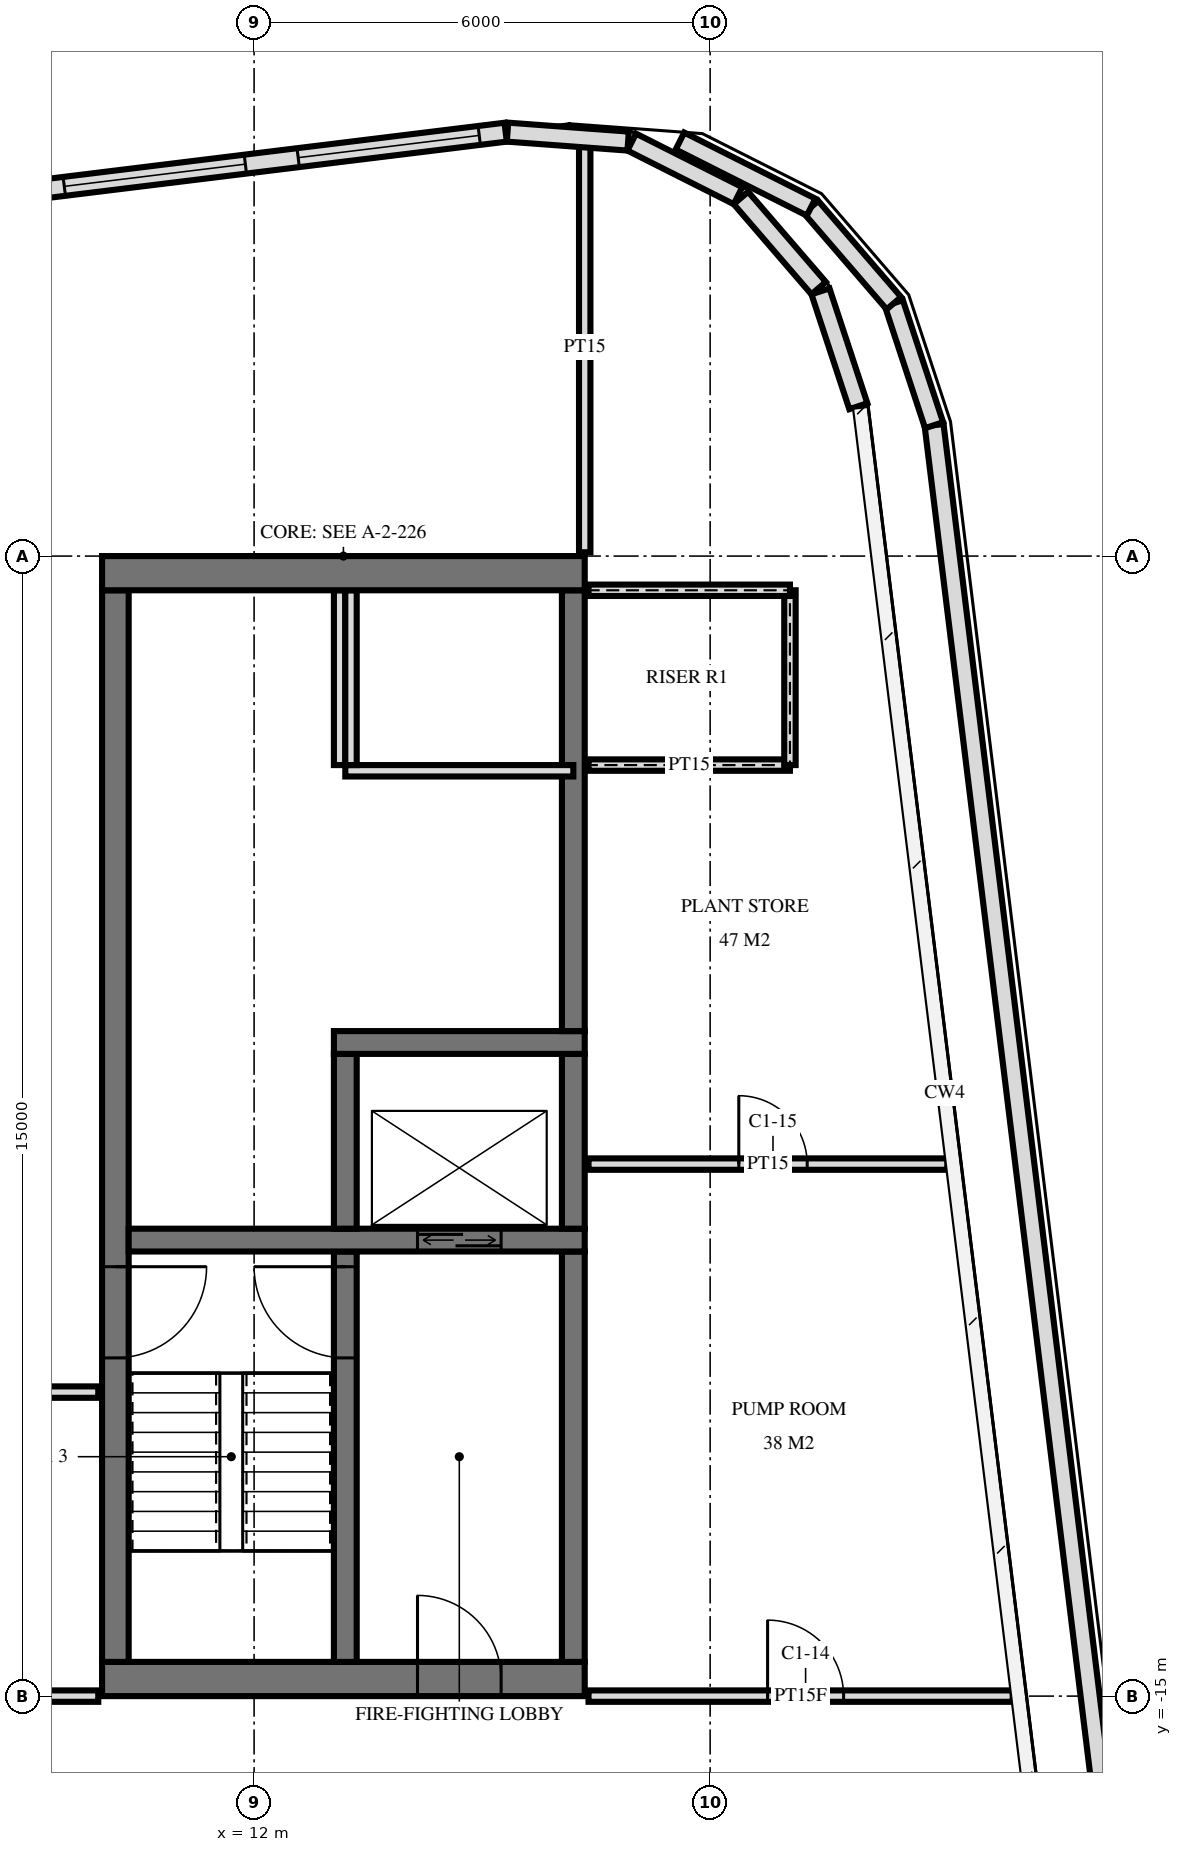
"""IFC4 building model, lengths in metres.
Left out: names, types, materials, properties, quantities, classifications, styles, units other than length and angle.
Written with IfcOpenShell. Run it as: python <this file> out.ifc"""

import sys

from ifc_helpers import new_model, si_unit, direction, frame, frame_2d, origin, place, context, subcontext, project, spatial, rectangle, extrude, element, fill, save


model = new_model("IFC4")
c1 = context("Model", 3, precision=1e-05, world=origin(), true_north=direction((0.0, 1.0)))
c2 = subcontext(c1, "Body", "Model", "MODEL_VIEW")
j1 = project(units=[si_unit("LENGTHUNIT", "METRE"), si_unit("PLANEANGLEUNIT", "RADIAN")], contexts=[c1])
p1 = place(None, origin())
s1 = spatial("IfcSite", under=j1, at=p1, CompositionType="ELEMENT")
p2 = place(p1, origin())
s2 = spatial("IfcBuilding", under=s1, at=p2, CompositionType="ELEMENT")
p3 = place(p2, frame((0.0, 0.0, 346.6)))
s3 = spatial("IfcBuildingStorey", under=s2, at=p3, CompositionType="ELEMENT", Elevation=346.6)
p4 = place(p3, frame((10.0, -0.225, 0.0), z_axis=(0.0, 0.0, 1.0), x_axis=(1.0, 0.0, 0.0)))
e1 = element("IfcWall", 1, at=p4, inside=s3, PredefinedType="SHEAR", context=c2, shape_type="SweptSolid", body=[
    extrude(rectangle(XDim=6.35, YDim=0.45, at=frame_2d((3.175, 0.0))), origin(), (0.0, 0.0, 1.0), 3.6),
])
p5 = place(p3, frame((10.0, -14.775, 0.0), z_axis=(0.0, 0.0, 1.0), x_axis=(1.0, 0.0, 0.0)))
e2 = element("IfcWall", 2, at=p5, inside=s3, PredefinedType="SHEAR", context=c2, shape_type="SweptSolid", body=[
    extrude(rectangle(XDim=6.35, YDim=0.45, at=frame_2d((3.175, 0.0))), origin(), (0.0, 0.0, 1.0), 3.6),
])
p6 = place(p5, frame((4.15, 0.0, 0.0)))
e3 = element("IfcOpeningElement", 3, at=p6, cuts=e2, PredefinedType="OPENING", context=c2, shape_type="SweptSolid", body=[
    extrude(rectangle(XDim=1.1, YDim=2.1, at=frame_2d((0.55, 1.05))), frame((0.0, 0.235, 0.0), z_axis=(0.0, -1.0, 0.0), x_axis=(1.0, 0.0, 0.0)), (0.0, 0.0, 1.0), 0.47),
])
p7 = place(p3, frame((10.175, -14.55, 0.0), z_axis=(0.0, 0.0, 1.0), x_axis=(0.0, 1.0, 0.0)))
e4 = element("IfcWall", 4, at=p7, inside=s3, PredefinedType="SHEAR", context=c2, shape_type="SweptSolid", body=[
    extrude(rectangle(XDim=14.1, YDim=0.35, at=frame_2d((7.05, 0.0))), origin(), (0.0, 0.0, 1.0), 3.6),
])
p8 = place(p7, frame((4.0, 0.0, 0.0)))
e5 = element("IfcOpeningElement", 5, at=p8, cuts=e4, PredefinedType="OPENING", context=c2, shape_type="SweptSolid", body=[
    extrude(rectangle(XDim=1.2, YDim=2.1, at=frame_2d((0.6, 1.05))), frame((0.0, 0.185, 0.0), z_axis=(0.0, -1.0, 0.0), x_axis=(1.0, 0.0, 0.0)), (0.0, 0.0, 1.0), 0.37),
])
p9 = place(p3, frame((16.2, -6.25, 0.0), z_axis=(0.0, 0.0, 1.0), x_axis=(0.0, 1.0, 0.0)))
e6 = element("IfcWall", 6, at=p9, inside=s3, PredefinedType="SHEAR", context=c2, shape_type="SweptSolid", body=[
    extrude(rectangle(XDim=5.8, YDim=0.3, at=frame_2d((2.9, 0.0))), origin(), (0.0, 0.0, 1.0), 3.6),
])
p10 = place(p3, frame((16.2, -14.55, 0.0), z_axis=(0.0, 0.0, 1.0), x_axis=(0.0, 1.0, 0.0)))
e7 = element("IfcWall", 7, at=p10, inside=s3, PredefinedType="SHEAR", context=c2, shape_type="SweptSolid", body=[
    extrude(rectangle(XDim=5.4, YDim=0.3, at=frame_2d((2.7, 0.0))), origin(), (0.0, 0.0, 1.0), 3.6),
])
p11 = place(p3, frame((10.35, -9.0, 0.0), z_axis=(0.0, 0.0, 1.0), x_axis=(1.0, 0.0, 0.0)))
e8 = element("IfcWall", 8, at=p11, inside=s3, PredefinedType="SHEAR", context=c2, shape_type="SweptSolid", body=[
    extrude(rectangle(XDim=6.0, YDim=0.3, at=frame_2d((3.0, 0.0))), origin(), (0.0, 0.0, 1.0), 3.6),
])
p12 = place(p11, frame((3.8, 0.0, 0.0)))
e9 = element("IfcOpeningElement", 9, at=p12, cuts=e8, PredefinedType="OPENING", context=c2, shape_type="SweptSolid", body=[
    extrude(rectangle(XDim=1.1, YDim=2.1, at=frame_2d((0.55, 1.05))), frame((0.0, 0.16, 0.0), z_axis=(0.0, -1.0, 0.0), x_axis=(1.0, 0.0, 0.0)), (0.0, 0.0, 1.0), 0.32),
])
p13 = place(p3, frame((13.2, -14.55, 0.0), z_axis=(0.0, 0.0, 1.0), x_axis=(0.0, 1.0, 0.0)))
e10 = element("IfcWall", 10, at=p13, inside=s3, PredefinedType="SHEAR", context=c2, shape_type="SweptSolid", body=[
    extrude(rectangle(XDim=5.4, YDim=0.3, at=frame_2d((2.7, 0.0))), origin(), (0.0, 0.0, 1.0), 3.6),
])
p14 = place(p13, frame((4.0, 0.0, 0.0)))
e11 = element("IfcOpeningElement", 11, at=p14, cuts=e10, PredefinedType="OPENING", context=c2, shape_type="SweptSolid", body=[
    extrude(rectangle(XDim=1.2, YDim=2.1, at=frame_2d((0.6, 1.05))), frame((0.0, 0.16, 0.0), z_axis=(0.0, -1.0, 0.0), x_axis=(1.0, 0.0, 0.0)), (0.0, 0.0, 1.0), 0.32),
])
p15 = place(p3, frame((13.05, -6.4, 0.0), z_axis=(0.0, 0.0, 1.0), x_axis=(1.0, 0.0, 0.0)))
e12 = element("IfcWall", 12, at=p15, inside=s3, PredefinedType="SHEAR", context=c2, shape_type="SweptSolid", body=[
    extrude(rectangle(XDim=3.3, YDim=0.3, at=frame_2d((1.65, 0.0))), origin(), (0.0, 0.0, 1.0), 3.6),
])
for number, where, z_axis, x_axis in (
    (13, (13.2, -8.85, 0.0), (0.0, 0.0, 1.0), (0.0, 1.0, 0.0)),
    (14, (16.2, -8.85, 0.0), (0.0, 0.0, 1.0), (0.0, 1.0, 0.0)),
):
    element("IfcWall", number, at=place(p3, frame(where, z_axis=z_axis, x_axis=x_axis)), inside=s3, PredefinedType="SHEAR", context=c2, shape_type="SweptSolid", body=[
        extrude(rectangle(XDim=2.3, YDim=0.3, at=frame_2d((1.15, 0.0))), origin(), (0.0, 0.0, 1.0), 3.6),
    ])
p16 = place(p3, frame((19.95, 1.972, 0.0), z_axis=(0.0, 0.0, 1.0), x_axis=(-0.313096613398, 0.949721280523, 0.0)))
e15 = element("IfcWall", 15, at=p16, inside=s3, PredefinedType="SOLIDWALL", context=c2, shape_type="SweptSolid", body=[
    extrude(rectangle(XDim=1.592, YDim=0.25, at=frame_2d((0.796, 0.0))), origin(), (0.0, 0.0, 1.0), 3.32),
])
p17 = place(p3, frame((19.427, 3.526, 0.0), z_axis=(0.0, 0.0, 1.0), x_axis=(-0.652779234622, 0.757548197045, 0.0)))
e16 = element("IfcWall", 16, at=p17, inside=s3, PredefinedType="SOLIDWALL", context=c2, shape_type="SweptSolid", body=[
    extrude(rectangle(XDim=1.566, YDim=0.25, at=frame_2d((0.783, 0.0))), origin(), (0.0, 0.0, 1.0), 3.32),
])
p18 = place(p3, frame((18.367, 4.742, 0.0), z_axis=(0.0, 0.0, 1.0), x_axis=(-0.893019896274, 0.450017182849, 0.0)))
e17 = element("IfcWall", 17, at=p18, inside=s3, PredefinedType="SOLIDWALL", context=c2, shape_type="SweptSolid", body=[
    extrude(rectangle(XDim=1.566, YDim=0.25, at=frame_2d((0.783, 0.0))), origin(), (0.0, 0.0, 1.0), 3.32),
])
p19 = place(p3, frame((16.921, 5.46, 0.0), z_axis=(0.0, 0.0, 1.0), x_axis=(-0.997261890612, 0.073950804812, 0.0)))
e18 = element("IfcWall", 18, at=p19, inside=s3, PredefinedType="SOLIDWALL", context=c2, shape_type="SweptSolid", body=[
    extrude(rectangle(XDim=1.591, YDim=0.25, at=frame_2d((0.796, 0.0))), origin(), (0.0, 0.0, 1.0), 3.32),
])
p20 = place(p3, frame((15.31, 5.577, 0.0), z_axis=(0.0, 0.0, 1.0), x_axis=(-0.992546767322, -0.12186432898, 0.0)))
e19 = element("IfcWall", 19, at=p20, inside=s3, PredefinedType="SOLIDWALL", context=c2, shape_type="SweptSolid", body=[
    extrude(rectangle(XDim=34.104, YDim=0.25, at=frame_2d((17.052, 0.0))), origin(), (0.0, 0.0, 1.0), 3.32),
])
p21 = place(p20, frame((0.35, 0.0, 0.498)))
e20 = element("IfcOpeningElement", 20, at=p21, cuts=e19, PredefinedType="OPENING", context=c2, shape_type="SweptSolid", body=[
    extrude(rectangle(XDim=2.4, YDim=2.622, at=frame_2d((1.2, 1.311))), frame((0.0, 0.135, 0.0), z_axis=(0.0, -1.0, 0.0), x_axis=(1.0, 0.0, 0.0)), (0.0, 0.0, 1.0), 0.27),
])
p22 = place(p20, frame((3.45, 0.0, 0.498)))
e21 = element("IfcOpeningElement", 21, at=p22, cuts=e19, PredefinedType="OPENING", context=c2, shape_type="SweptSolid", body=[
    extrude(rectangle(XDim=2.4, YDim=2.622, at=frame_2d((1.2, 1.311))), frame((0.0, 0.135, 0.0), z_axis=(0.0, -1.0, 0.0), x_axis=(1.0, 0.0, 0.0)), (0.0, 0.0, 1.0), 0.27),
])
p23 = place(p20, frame((6.551, 0.0, 0.498)))
e22 = element("IfcOpeningElement", 22, at=p23, cuts=e19, PredefinedType="OPENING", context=c2, shape_type="SweptSolid", body=[
    extrude(rectangle(XDim=2.4, YDim=2.622, at=frame_2d((1.2, 1.311))), frame((0.0, 0.135, 0.0), z_axis=(0.0, -1.0, 0.0), x_axis=(1.0, 0.0, 0.0)), (0.0, 0.0, 1.0), 0.27),
])
p24 = place(p20, frame((9.651, 0.0, 0.498)))
e23 = element("IfcOpeningElement", 23, at=p24, cuts=e19, PredefinedType="OPENING", context=c2, shape_type="SweptSolid", body=[
    extrude(rectangle(XDim=2.4, YDim=2.622, at=frame_2d((1.2, 1.311))), frame((0.0, 0.135, 0.0), z_axis=(0.0, -1.0, 0.0), x_axis=(1.0, 0.0, 0.0)), (0.0, 0.0, 1.0), 0.27),
])
p25 = place(p20, frame((12.751, 0.0, 0.498)))
e24 = element("IfcOpeningElement", 24, at=p25, cuts=e19, PredefinedType="OPENING", context=c2, shape_type="SweptSolid", body=[
    extrude(rectangle(XDim=2.4, YDim=2.622, at=frame_2d((1.2, 1.311))), frame((0.0, 0.135, 0.0), z_axis=(0.0, -1.0, 0.0), x_axis=(1.0, 0.0, 0.0)), (0.0, 0.0, 1.0), 0.27),
])
p26 = place(p20, frame((15.852, 0.0, 0.498)))
e25 = element("IfcOpeningElement", 25, at=p26, cuts=e19, PredefinedType="OPENING", context=c2, shape_type="SweptSolid", body=[
    extrude(rectangle(XDim=2.4, YDim=2.622, at=frame_2d((1.2, 1.311))), frame((0.0, 0.135, 0.0), z_axis=(0.0, -1.0, 0.0), x_axis=(1.0, 0.0, 0.0)), (0.0, 0.0, 1.0), 0.27),
])
p27 = place(p20, frame((18.952, 0.0, 0.498)))
e26 = element("IfcOpeningElement", 26, at=p27, cuts=e19, PredefinedType="OPENING", context=c2, shape_type="SweptSolid", body=[
    extrude(rectangle(XDim=2.4, YDim=2.622, at=frame_2d((1.2, 1.311))), frame((0.0, 0.135, 0.0), z_axis=(0.0, -1.0, 0.0), x_axis=(1.0, 0.0, 0.0)), (0.0, 0.0, 1.0), 0.27),
])
p28 = place(p20, frame((22.052, 0.0, 0.498)))
e27 = element("IfcOpeningElement", 27, at=p28, cuts=e19, PredefinedType="OPENING", context=c2, shape_type="SweptSolid", body=[
    extrude(rectangle(XDim=2.4, YDim=2.622, at=frame_2d((1.2, 1.311))), frame((0.0, 0.135, 0.0), z_axis=(0.0, -1.0, 0.0), x_axis=(1.0, 0.0, 0.0)), (0.0, 0.0, 1.0), 0.27),
])
p29 = place(p20, frame((25.153, 0.0, 0.498)))
e28 = element("IfcOpeningElement", 28, at=p29, cuts=e19, PredefinedType="OPENING", context=c2, shape_type="SweptSolid", body=[
    extrude(rectangle(XDim=2.4, YDim=2.622, at=frame_2d((1.2, 1.311))), frame((0.0, 0.135, 0.0), z_axis=(0.0, -1.0, 0.0), x_axis=(1.0, 0.0, 0.0)), (0.0, 0.0, 1.0), 0.27),
])
p30 = place(p20, frame((28.253, 0.0, 0.498)))
e29 = element("IfcOpeningElement", 29, at=p30, cuts=e19, PredefinedType="OPENING", context=c2, shape_type="SweptSolid", body=[
    extrude(rectangle(XDim=2.4, YDim=2.622, at=frame_2d((1.2, 1.311))), frame((0.0, 0.135, 0.0), z_axis=(0.0, -1.0, 0.0), x_axis=(1.0, 0.0, 0.0)), (0.0, 0.0, 1.0), 0.27),
])
p31 = place(p20, frame((31.353, 0.0, 0.498)))
e30 = element("IfcOpeningElement", 30, at=p31, cuts=e19, PredefinedType="OPENING", context=c2, shape_type="SweptSolid", body=[
    extrude(rectangle(XDim=2.4, YDim=2.622, at=frame_2d((1.2, 1.311))), frame((0.0, 0.135, 0.0), z_axis=(0.0, -1.0, 0.0), x_axis=(1.0, 0.0, 0.0)), (0.0, 0.0, 1.0), 0.27),
])
p32 = place(p3, frame((17.603, 5.461, 0.0), z_axis=(0.0, 0.0, 1.0), x_axis=(0.892982053633, -0.450092270417, 0.0)))
e31 = element("IfcWall", 31, at=p32, inside=s3, PredefinedType="PARAPET", context=c2, shape_type="SweptSolid", body=[
    extrude(rectangle(XDim=1.932, YDim=0.25, at=frame_2d((0.966, 0.0))), origin(), (0.0, 0.0, 1.0), 1.1),
])
p33 = place(p3, frame((19.328, 4.591, 0.0), z_axis=(0.0, 0.0, 1.0), x_axis=(0.652693518333, -0.757622050316, 0.0)))
e32 = element("IfcWall", 32, at=p33, inside=s3, PredefinedType="PARAPET", context=c2, shape_type="SweptSolid", body=[
    extrude(rectangle(XDim=1.668, YDim=0.25, at=frame_2d((0.834, 0.0))), origin(), (0.0, 0.0, 1.0), 1.1),
])
p34 = place(p3, frame((20.417, 3.327, 0.0), z_axis=(0.0, 0.0, 1.0), x_axis=(0.313149495959, -0.949703844986, 0.0)))
e33 = element("IfcWall", 33, at=p34, inside=s3, PredefinedType="PARAPET", context=c2, shape_type="SweptSolid", body=[
    extrude(rectangle(XDim=1.69, YDim=0.25, at=frame_2d((0.845, 0.0))), origin(), (0.0, 0.0, 1.0), 1.1),
])
p35 = place(p3, frame((20.947, 1.722, 0.0), z_axis=(0.0, 0.0, 1.0), x_axis=(0.12187456146, -0.992545510931, 0.0)))
e34 = element("IfcWall", 34, at=p35, inside=s3, PredefinedType="PARAPET", context=c2, shape_type="SweptSolid", body=[
    extrude(rectangle(XDim=19.157, YDim=0.25, at=frame_2d((9.578, 0.0))), origin(), (0.0, 0.0, 1.0), 1.1),
])
p36 = place(p3, frame((13.125, -2.75, 0.0), z_axis=(0.0, 0.0, 1.0), x_axis=(0.0, 1.0, 0.0)))
e35 = element("IfcWall", 35, at=p36, inside=s3, PredefinedType="PARTITIONING", context=c2, shape_type="SweptSolid", body=[
    extrude(rectangle(XDim=2.3, YDim=0.15, at=frame_2d((1.15, 0.0))), origin(), (0.0, 0.0, 1.0), 0.8),
])
p37 = place(p3, frame((13.2, -2.825, 0.0), z_axis=(0.0, 0.0, 1.0), x_axis=(1.0, 0.0, 0.0)))
e36 = element("IfcWall", 36, at=p37, inside=s3, PredefinedType="PARTITIONING", context=c2, shape_type="SweptSolid", body=[
    extrude(rectangle(XDim=3.0, YDim=0.15, at=frame_2d((1.5, 0.0))), origin(), (0.0, 0.0, 1.0), 0.8),
])
p38 = place(p3, frame((13.275, -2.75, 0.0), z_axis=(0.0, 0.0, 1.0), x_axis=(0.0, 1.0, 0.0)))
e37 = element("IfcWall", 37, at=p38, inside=s3, PredefinedType="PARTITIONING", context=c2, shape_type="SweptSolid", body=[
    extrude(rectangle(XDim=2.3, YDim=0.15, at=frame_2d((1.15, 0.0))), origin(), (0.0, 0.0, 1.0), 0.8),
])
p39 = place(p3, frame((19.05, -2.75, 0.0), z_axis=(0.0, 0.0, 1.0), x_axis=(0.0, 1.0, 0.0)))
e38 = element("IfcWall", 38, at=p39, inside=s3, PredefinedType="PARTITIONING", context=c2, shape_type="SweptSolid", body=[
    extrude(rectangle(XDim=2.3, YDim=0.15, at=frame_2d((1.15, 0.0))), origin(), (0.0, 0.0, 1.0), 3.32),
])
p40 = place(p3, frame((16.35, 0.05, 0.0), z_axis=(0.0, 0.0, 1.0), x_axis=(0.0, 1.0, 0.0)))
e39 = element("IfcWall", 39, at=p40, inside=s3, PredefinedType="PARTITIONING", context=c2, shape_type="SweptSolid", body=[
    extrude(rectangle(XDim=5.397, YDim=0.15, at=frame_2d((2.699, 0.0))), origin(), (0.0, 0.0, 1.0), 3.32),
])
p41 = place(p3, frame((-9.95, -15.0, 0.0), z_axis=(0.0, 0.0, 1.0), x_axis=(1.0, 0.0, 0.0)))
e40 = element("IfcWall", 40, at=p41, inside=s3, PredefinedType="PARTITIONING", context=c2, shape_type="SweptSolid", body=[
    extrude(rectangle(XDim=19.9, YDim=0.15, at=frame_2d((9.95, 0.0))), origin(), (0.0, 0.0, 1.0), 2.684),
])
p42 = place(p41, frame((9.43, 0.0, 0.0)))
e41 = element("IfcOpeningElement", 41, at=p42, cuts=e40, PredefinedType="OPENING", context=c2, shape_type="SweptSolid", body=[
    extrude(rectangle(XDim=1.0, YDim=2.1, at=frame_2d((0.5, 1.05))), frame((0.0, 0.085, 0.0), z_axis=(0.0, -1.0, 0.0), x_axis=(1.0, 0.0, 0.0)), (0.0, 0.0, 1.0), 0.17),
])
p43 = place(p3, frame((16.4, -15.0, 0.0), z_axis=(0.0, 0.0, 1.0), x_axis=(1.0, 0.0, 0.0)))
e42 = element("IfcWall", 42, at=p43, inside=s3, PredefinedType="PARTITIONING", context=c2, shape_type="SweptSolid", body=[
    extrude(rectangle(XDim=5.581, YDim=0.15, at=frame_2d((2.791, 0.0))), origin(), (0.0, 0.0, 1.0), 3.32),
])
p44 = place(p43, frame((2.356, 0.0, 0.0)))
e43 = element("IfcOpeningElement", 43, at=p44, cuts=e42, PredefinedType="OPENING", context=c2, shape_type="SweptSolid", body=[
    extrude(rectangle(XDim=1.0, YDim=2.1, at=frame_2d((0.5, 1.05))), frame((0.0, 0.085, 0.0), z_axis=(0.0, -1.0, 0.0), x_axis=(1.0, 0.0, 0.0)), (0.0, 0.0, 1.0), 0.17),
])
p45 = place(p3, frame((-9.95, -11.0, 0.0), z_axis=(0.0, 0.0, 1.0), x_axis=(1.0, 0.0, 0.0)))
e44 = element("IfcWall", 44, at=p45, inside=s3, PredefinedType="PARTITIONING", context=c2, shape_type="SweptSolid", body=[
    extrude(rectangle(XDim=19.9, YDim=0.15, at=frame_2d((9.95, 0.0))), origin(), (0.0, 0.0, 1.0), 3.32),
])
p46 = place(p3, frame((16.4, -8.0, 0.0), z_axis=(0.0, 0.0, 1.0), x_axis=(1.0, 0.0, 0.0)))
e45 = element("IfcWall", 45, at=p46, inside=s3, PredefinedType="PARTITIONING", context=c2, shape_type="SweptSolid", body=[
    extrude(rectangle(XDim=4.721, YDim=0.15, at=frame_2d((2.361, 0.0))), origin(), (0.0, 0.0, 1.0), 3.32),
])
p47 = place(p46, frame((1.977, 0.0, 0.0)))
e46 = element("IfcOpeningElement", 46, at=p47, cuts=e45, PredefinedType="OPENING", context=c2, shape_type="SweptSolid", body=[
    extrude(rectangle(XDim=0.9, YDim=2.1, at=frame_2d((0.45, 1.05))), frame((0.0, 0.085, 0.0), z_axis=(0.0, -1.0, 0.0), x_axis=(1.0, 0.0, 0.0)), (0.0, 0.0, 1.0), 0.17),
])
for number, where, z_axis, x_axis in (
    (47, (16.4, -2.75, 0.0), (0.0, 0.0, 1.0), (1.0, 0.0, 0.0)),
    (48, (16.4, -0.45, 0.0), (0.0, 0.0, 1.0), (1.0, 0.0, 0.0)),
):
    element("IfcWall", number, at=place(p3, frame(where, z_axis=z_axis, x_axis=x_axis)), inside=s3, PredefinedType="PARTITIONING", context=c2, shape_type="SweptSolid", body=[
        extrude(rectangle(XDim=2.65, YDim=0.15, at=frame_2d((1.325, 0.0))), origin(), (0.0, 0.0, 1.0), 3.32),
    ])
p48 = place(p21, origin())
e49 = element("IfcWindow", 49, at=p48, inside=s3, PartitioningType="SINGLE_PANEL", PredefinedType="USERDEFINED", context=c2, shape_type="SweptSolid", body=[
    extrude(rectangle(XDim=2.4, YDim=2.622, at=frame_2d((1.2, 1.311))), frame((0.0, 0.03, 0.0), z_axis=(0.0, -1.0, 0.0), x_axis=(1.0, 0.0, 0.0)), (0.0, 0.0, 1.0), 0.06),
])
fill(e20, e49)
p49 = place(p22, origin())
e50 = element("IfcWindow", 50, at=p49, inside=s3, PartitioningType="SINGLE_PANEL", PredefinedType="USERDEFINED", context=c2, shape_type="SweptSolid", body=[
    extrude(rectangle(XDim=2.4, YDim=2.622, at=frame_2d((1.2, 1.311))), frame((0.0, 0.03, 0.0), z_axis=(0.0, -1.0, 0.0), x_axis=(1.0, 0.0, 0.0)), (0.0, 0.0, 1.0), 0.06),
])
fill(e21, e50)
p50 = place(p12, origin())
e51 = element("IfcDoor", 51, at=p50, inside=s3, OperationType="DOUBLE_DOOR_SLIDING", PredefinedType="USERDEFINED", context=c2, shape_type="SweptSolid", body=[
    extrude(rectangle(XDim=1.1, YDim=2.1, at=frame_2d((0.55, 1.05))), frame((0.0, 0.025, 0.0), z_axis=(0.0, -1.0, 0.0), x_axis=(1.0, 0.0, 0.0)), (0.0, 0.0, 1.0), 0.05),
])
fill(e9, e51)
p51 = place(p8, frame((0.6, 0.0, 0.0), z_axis=(0.0, 0.0, 1.0), x_axis=(-1.0, 0.0, 0.0)))
e52 = element("IfcDoor", 52, at=p51, inside=s3, OperationType="SINGLE_SWING_RIGHT", PredefinedType="DOOR", context=c2, shape_type="SweptSolid", body=[
    extrude(rectangle(XDim=1.2, YDim=2.1, at=frame_2d((0.0, 1.05))), frame((0.0, -0.025, 0.0), z_axis=(0.0, 1.0, 0.0), x_axis=(-1.0, 0.0, 0.0)), (0.0, 0.0, 1.0), 0.05),
])
fill(e5, e52)
p52 = place(p6, origin())
e53 = element("IfcDoor", 53, at=p52, inside=s3, OperationType="SINGLE_SWING_RIGHT", PredefinedType="DOOR", context=c2, shape_type="SweptSolid", body=[
    extrude(rectangle(XDim=1.1, YDim=2.1, at=frame_2d((0.55, 1.05))), frame((0.0, 0.025, 0.0), z_axis=(0.0, -1.0, 0.0), x_axis=(1.0, 0.0, 0.0)), (0.0, 0.0, 1.0), 0.05),
])
fill(e3, e53)
p53 = place(p14, origin())
e54 = element("IfcDoor", 54, at=p53, inside=s3, OperationType="SINGLE_SWING_LEFT", PredefinedType="DOOR", context=c2, shape_type="SweptSolid", body=[
    extrude(rectangle(XDim=1.2, YDim=2.1, at=frame_2d((0.6, 1.05))), frame((0.0, 0.025, 0.0), z_axis=(0.0, -1.0, 0.0), x_axis=(1.0, 0.0, 0.0)), (0.0, 0.0, 1.0), 0.05),
])
fill(e11, e54)
p54 = place(p44, origin())
e55 = element("IfcDoor", 55, at=p54, inside=s3, OperationType="SINGLE_SWING_RIGHT", PredefinedType="DOOR", context=c2, shape_type="SweptSolid", body=[
    extrude(rectangle(XDim=1.0, YDim=2.1, at=frame_2d((0.5, 1.05))), frame((0.0, 0.025, 0.0), z_axis=(0.0, -1.0, 0.0), x_axis=(1.0, 0.0, 0.0)), (0.0, 0.0, 1.0), 0.05),
])
fill(e43, e55)
p55 = place(p47, origin())
e56 = element("IfcDoor", 56, at=p55, inside=s3, OperationType="SINGLE_SWING_RIGHT", PredefinedType="DOOR", context=c2, shape_type="SweptSolid", body=[
    extrude(rectangle(XDim=0.9, YDim=2.1, at=frame_2d((0.45, 1.05))), frame((0.0, 0.025, 0.0), z_axis=(0.0, -1.0, 0.0), x_axis=(1.0, 0.0, 0.0)), (0.0, 0.0, 1.0), 0.05),
])
fill(e46, e56)
save(model, sys.argv[1])
